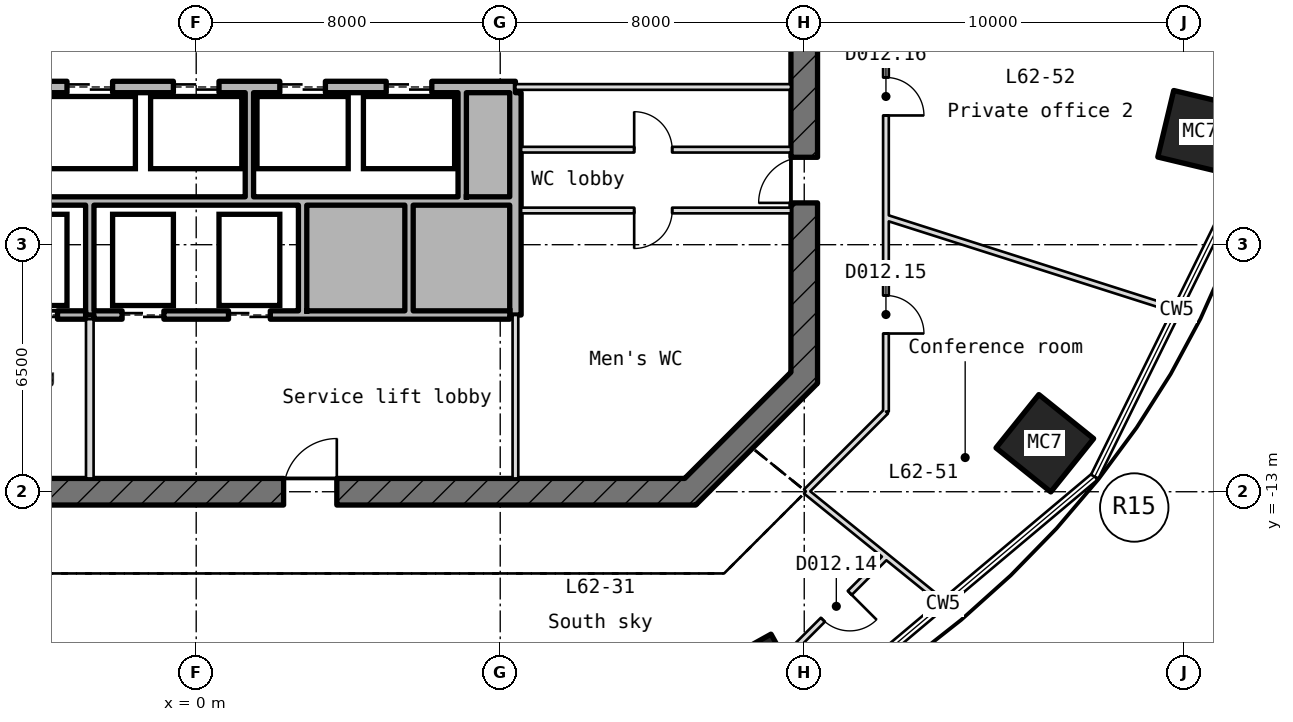
"""IFC4 building model, lengths in metres.
Left out: names, types, materials, properties, quantities, classifications, styles, units other than length and angle.
Written with IfcOpenShell. Run it as: python <this file> out.ifc"""

import sys

from ifc_helpers import new_model, si_unit, direction, frame, frame_2d, origin, origin_2d, place, context, subcontext, project, spatial, rectangle, hollow_rectangle, extrude, element, fill, save


model = new_model("IFC4")
c1 = context("Model", 3, precision=1e-05, world=origin(), true_north=direction((0.0, 1.0)))
c2 = subcontext(c1, "Body", "Model", "MODEL_VIEW")
j1 = project(units=[si_unit("LENGTHUNIT", "METRE"), si_unit("PLANEANGLEUNIT", "RADIAN")], contexts=[c1])
p1 = place(None, origin())
s1 = spatial("IfcSite", under=j1, at=p1, CompositionType="ELEMENT")
p2 = place(p1, origin())
s2 = spatial("IfcBuilding", under=s1, at=p2, CompositionType="ELEMENT")
p3 = place(p2, frame((0.0, 0.0, 279.1)))
s3 = spatial("IfcBuildingStorey", under=s2, at=p3, CompositionType="ELEMENT", Elevation=279.1)
for number, where, z_axis, x_axis in (
    (1, (14.788, -17.993, -0.25), (0.0, 0.0, 1.0), (-0.874, -0.486, 0.0)),
    (2, (22.331, -11.724, -0.25), (0.0, 0.0, 1.0), (-0.627, -0.779, 0.0)),
    (3, (26.413, -3.533, -0.25), (0.0, 0.0, 1.0), (-0.233, -0.973, 0.0)),
):
    element("IfcColumn", number, at=place(p3, frame(where, z_axis=z_axis, x_axis=x_axis)), inside=s3, PredefinedType="COLUMN", context=c2, shape_type="SweptSolid", body=[
        extrude(hollow_rectangle(XDim=1.8, YDim=1.85, WallThickness=0.06, at=origin_2d()), origin(), (0.0, 0.0, 1.0), 5.47),
    ])
p4 = place(p3, frame((12.897, -13.103, -0.25), z_axis=(0.0, 0.0, 1.0), x_axis=(0.707106781187, 0.707106781187, 0.0)))
e4 = element("IfcWall", 4, at=p4, inside=s3, PredefinedType="SHEAR", context=c2, shape_type="SweptSolid", body=[
    extrude(rectangle(XDim=4.533, YDim=0.7, at=frame_2d((2.266, 0.0))), origin(), (0.0, 0.0, 1.0), 5.47),
])
p5 = place(p3, frame((16.0, -10.145, -0.25), z_axis=(0.0, 0.0, 1.0), x_axis=(0.0, 1.0, 0.0)))
e5 = element("IfcWall", 5, at=p5, inside=s3, PredefinedType="SHEAR", context=c2, shape_type="SweptSolid", body=[
    extrude(rectangle(XDim=20.29, YDim=0.7, at=frame_2d((10.145, 0.0))), origin(), (0.0, 0.0, 1.0), 5.47),
])
p6 = place(p5, frame((8.945, 0.0, 0.25)))
e6 = element("IfcOpeningElement", 6, at=p6, cuts=e5, PredefinedType="OPENING", context=c2, shape_type="SweptSolid", body=[
    extrude(rectangle(XDim=2.4, YDim=2.1, at=frame_2d((1.2, 1.05))), frame((0.0, 0.36, 0.0), z_axis=(0.0, -1.0, 0.0), x_axis=(1.0, 0.0, 0.0)), (0.0, 0.0, 1.0), 0.72),
])
p7 = place(p5, frame((13.545, 0.0, 0.25)))
e7 = element("IfcOpeningElement", 7, at=p7, cuts=e5, PredefinedType="OPENING", context=c2, shape_type="SweptSolid", body=[
    extrude(rectangle(XDim=1.2, YDim=2.1, at=frame_2d((0.6, 1.05))), frame((0.0, 0.36, 0.0), z_axis=(0.0, -1.0, 0.0), x_axis=(1.0, 0.0, 0.0)), (0.0, 0.0, 1.0), 0.72),
])
p8 = place(p5, frame((4.745, 0.0, 0.25)))
e8 = element("IfcOpeningElement", 8, at=p8, cuts=e5, PredefinedType="OPENING", context=c2, shape_type="SweptSolid", body=[
    extrude(rectangle(XDim=1.2, YDim=2.1, at=frame_2d((0.6, 1.05))), frame((0.0, 0.36, 0.0), z_axis=(0.0, -1.0, 0.0), x_axis=(1.0, 0.0, 0.0)), (0.0, 0.0, 1.0), 0.72),
])
p9 = place(p3, frame((-13.145, -13.0, -0.25), z_axis=(0.0, 0.0, 1.0), x_axis=(1.0, 0.0, 0.0)))
e9 = element("IfcWall", 9, at=p9, inside=s3, PredefinedType="SHEAR", context=c2, shape_type="SweptSolid", body=[
    extrude(rectangle(XDim=26.29, YDim=0.7, at=frame_2d((13.145, 0.0))), origin(), (0.0, 0.0, 1.0), 5.47),
])
p10 = place(p9, frame((2.845, 0.0, 0.25)))
e10 = element("IfcOpeningElement", 10, at=p10, cuts=e9, PredefinedType="OPENING", context=c2, shape_type="SweptSolid", body=[
    extrude(rectangle(XDim=1.2, YDim=2.1, at=frame_2d((0.6, 1.05))), frame((0.0, 0.36, 0.0), z_axis=(0.0, -1.0, 0.0), x_axis=(1.0, 0.0, 0.0)), (0.0, 0.0, 1.0), 0.72),
])
p11 = place(p9, frame((6.845, 0.0, 0.25)))
e11 = element("IfcOpeningElement", 11, at=p11, cuts=e9, PredefinedType="OPENING", context=c2, shape_type="SweptSolid", body=[
    extrude(rectangle(XDim=1.4, YDim=2.1, at=frame_2d((0.7, 1.05))), frame((0.0, 0.36, 0.0), z_axis=(0.0, -1.0, 0.0), x_axis=(1.0, 0.0, 0.0)), (0.0, 0.0, 1.0), 0.72),
])
p12 = place(p9, frame((15.445, 0.0, 0.25)))
e12 = element("IfcOpeningElement", 12, at=p12, cuts=e9, PredefinedType="OPENING", context=c2, shape_type="SweptSolid", body=[
    extrude(rectangle(XDim=1.4, YDim=2.1, at=frame_2d((0.7, 1.05))), frame((0.0, 0.36, 0.0), z_axis=(0.0, -1.0, 0.0), x_axis=(1.0, 0.0, 0.0)), (0.0, 0.0, 1.0), 0.72),
])
p13 = place(p3, frame((-8.25, -8.35, 0.0), z_axis=(0.0, 0.0, 1.0), x_axis=(1.0, 0.0, 0.0)))
e13 = element("IfcWall", 13, at=p13, inside=s3, PredefinedType="STANDARD", context=c2, shape_type="SweptSolid", body=[
    extrude(rectangle(XDim=5.34, YDim=0.22, at=frame_2d((2.67, 0.0))), origin(), (0.0, 0.0, 1.0), 5.22),
])
p14 = place(p13, frame((0.7, 0.0, 0.0)))
e14 = element("IfcOpeningElement", 14, at=p14, cuts=e13, PredefinedType="OPENING", context=c2, shape_type="SweptSolid", body=[
    extrude(rectangle(XDim=1.1, YDim=2.1, at=frame_2d((0.55, 1.05))), frame((0.0, 0.12, 0.0), z_axis=(0.0, -1.0, 0.0), x_axis=(1.0, 0.0, 0.0)), (0.0, 0.0, 1.0), 0.24),
])
p15 = place(p13, frame((3.5, 0.0, 0.0)))
e15 = element("IfcOpeningElement", 15, at=p15, cuts=e13, PredefinedType="OPENING", context=c2, shape_type="SweptSolid", body=[
    extrude(rectangle(XDim=1.1, YDim=2.1, at=frame_2d((0.55, 1.05))), frame((0.0, 0.12, 0.0), z_axis=(0.0, -1.0, 0.0), x_axis=(1.0, 0.0, 0.0)), (0.0, 0.0, 1.0), 0.24),
])
p16 = place(p3, frame((-2.69, -8.35, 0.0), z_axis=(0.0, 0.0, 1.0), x_axis=(1.0, 0.0, 0.0)))
e16 = element("IfcWall", 16, at=p16, inside=s3, PredefinedType="STANDARD", context=c2, shape_type="SweptSolid", body=[
    extrude(rectangle(XDim=10.94, YDim=0.22, at=frame_2d((5.47, 0.0))), origin(), (0.0, 0.0, 1.0), 5.22),
])
p17 = place(p16, frame((0.74, 0.0, 0.0)))
e17 = element("IfcOpeningElement", 17, at=p17, cuts=e16, PredefinedType="OPENING", context=c2, shape_type="SweptSolid", body=[
    extrude(rectangle(XDim=1.1, YDim=2.1, at=frame_2d((0.55, 1.05))), frame((0.0, 0.12, 0.0), z_axis=(0.0, -1.0, 0.0), x_axis=(1.0, 0.0, 0.0)), (0.0, 0.0, 1.0), 0.24),
])
p18 = place(p16, frame((3.54, 0.0, 0.0)))
e18 = element("IfcOpeningElement", 18, at=p18, cuts=e16, PredefinedType="OPENING", context=c2, shape_type="SweptSolid", body=[
    extrude(rectangle(XDim=1.1, YDim=2.1, at=frame_2d((0.55, 1.05))), frame((0.0, 0.12, 0.0), z_axis=(0.0, -1.0, 0.0), x_axis=(1.0, 0.0, 0.0)), (0.0, 0.0, 1.0), 0.24),
])
p19 = place(p3, frame((8.55, -5.6, 0.0), z_axis=(0.0, 0.0, 1.0), x_axis=(1.0, 0.0, 0.0)))
e19 = element("IfcWall", 19, at=p19, inside=s3, PredefinedType="PARTITIONING", context=c2, shape_type="SweptSolid", body=[
    extrude(rectangle(XDim=7.1, YDim=0.15, at=frame_2d((3.55, 0.0))), origin(), (0.0, 0.0, 1.0), 5.22),
])
p20 = place(p19, frame((2.975, 0.0, 0.0)))
e20 = element("IfcOpeningElement", 20, at=p20, cuts=e19, PredefinedType="OPENING", context=c2, shape_type="SweptSolid", body=[
    extrude(rectangle(XDim=1.0, YDim=2.1, at=frame_2d((0.5, 1.05))), frame((0.0, 0.085, 0.0), z_axis=(0.0, -1.0, 0.0), x_axis=(1.0, 0.0, 0.0)), (0.0, 0.0, 1.0), 0.17),
])
p21 = place(p3, frame((-8.25, -5.35, 0.0), z_axis=(0.0, 0.0, 1.0), x_axis=(1.0, 0.0, 0.0)))
e21 = element("IfcWall", 21, at=p21, inside=s3, PredefinedType="STANDARD", context=c2, shape_type="SweptSolid", body=[
    extrude(rectangle(XDim=16.5, YDim=0.22, at=frame_2d((8.25, 0.0))), origin(), (0.0, 0.0, 1.0), 5.22),
])
p22 = place(p3, frame((8.55, -4.0, 0.0), z_axis=(0.0, 0.0, 1.0), x_axis=(1.0, 0.0, 0.0)))
e22 = element("IfcWall", 22, at=p22, inside=s3, PredefinedType="PARTITIONING", context=c2, shape_type="SweptSolid", body=[
    extrude(rectangle(XDim=7.1, YDim=0.15, at=frame_2d((3.55, 0.0))), origin(), (0.0, 0.0, 1.0), 5.22),
])
p23 = place(p22, frame((2.975, 0.0, 0.0)))
e23 = element("IfcOpeningElement", 23, at=p23, cuts=e22, PredefinedType="OPENING", context=c2, shape_type="SweptSolid", body=[
    extrude(rectangle(XDim=1.0, YDim=2.1, at=frame_2d((0.5, 1.05))), frame((0.0, 0.085, 0.0), z_axis=(0.0, -1.0, 0.0), x_axis=(1.0, 0.0, 0.0)), (0.0, 0.0, 1.0), 0.17),
])
p24 = place(p3, frame((-8.4, -2.35, -0.25), z_axis=(0.0, 0.0, 1.0), x_axis=(1.0, 0.0, 0.0)))
e24 = element("IfcWall", 24, at=p24, inside=s3, PredefinedType="SHEAR", context=c2, shape_type="SweptSolid", body=[
    extrude(rectangle(XDim=16.8, YDim=0.3, at=frame_2d((8.4, 0.0))), origin(), (0.0, 0.0, 1.0), 5.47),
])
p25 = place(p24, frame((2.2, 0.0, 0.25)))
e25 = element("IfcOpeningElement", 25, at=p25, cuts=e24, PredefinedType="OPENING", context=c2, shape_type="SweptSolid", body=[
    extrude(rectangle(XDim=1.2, YDim=2.1, at=frame_2d((0.6, 1.05))), frame((0.0, 0.16, 0.0), z_axis=(0.0, -1.0, 0.0), x_axis=(1.0, 0.0, 0.0)), (0.0, 0.0, 1.0), 0.32),
])
p26 = place(p24, frame((5.0, 0.0, 0.25)))
e26 = element("IfcOpeningElement", 26, at=p26, cuts=e24, PredefinedType="OPENING", context=c2, shape_type="SweptSolid", body=[
    extrude(rectangle(XDim=1.2, YDim=2.1, at=frame_2d((0.6, 1.05))), frame((0.0, 0.16, 0.0), z_axis=(0.0, -1.0, 0.0), x_axis=(1.0, 0.0, 0.0)), (0.0, 0.0, 1.0), 0.32),
])
p27 = place(p24, frame((7.8, 0.0, 0.25)))
e27 = element("IfcOpeningElement", 27, at=p27, cuts=e24, PredefinedType="OPENING", context=c2, shape_type="SweptSolid", body=[
    extrude(rectangle(XDim=1.2, YDim=2.1, at=frame_2d((0.6, 1.05))), frame((0.0, 0.16, 0.0), z_axis=(0.0, -1.0, 0.0), x_axis=(1.0, 0.0, 0.0)), (0.0, 0.0, 1.0), 0.32),
])
p28 = place(p24, frame((10.6, 0.0, 0.25)))
e28 = element("IfcOpeningElement", 28, at=p28, cuts=e24, PredefinedType="OPENING", context=c2, shape_type="SweptSolid", body=[
    extrude(rectangle(XDim=1.2, YDim=2.1, at=frame_2d((0.6, 1.05))), frame((0.0, 0.16, 0.0), z_axis=(0.0, -1.0, 0.0), x_axis=(1.0, 0.0, 0.0)), (0.0, 0.0, 1.0), 0.32),
])
p29 = place(p24, frame((13.4, 0.0, 0.25)))
e29 = element("IfcOpeningElement", 29, at=p29, cuts=e24, PredefinedType="OPENING", context=c2, shape_type="SweptSolid", body=[
    extrude(rectangle(XDim=1.2, YDim=2.1, at=frame_2d((0.6, 1.05))), frame((0.0, 0.16, 0.0), z_axis=(0.0, -1.0, 0.0), x_axis=(1.0, 0.0, 0.0)), (0.0, 0.0, 1.0), 0.32),
])
p30 = place(p3, frame((8.4, -2.35, 0.0), z_axis=(0.0, 0.0, 1.0), x_axis=(1.0, 0.0, 0.0)))
e30 = element("IfcWall", 30, at=p30, inside=s3, PredefinedType="PARTITIONING", context=c2, shape_type="SweptSolid", body=[
    extrude(rectangle(XDim=7.25, YDim=0.15, at=frame_2d((3.625, 0.0))), origin(), (0.0, 0.0, 1.0), 5.22),
])
p31 = place(p3, frame((-2.8, -12.65, 0.0), z_axis=(0.0, 0.0, 1.0), x_axis=(0.0, 1.0, 0.0)))
e31 = element("IfcWall", 31, at=p31, inside=s3, PredefinedType="PARTITIONING", context=c2, shape_type="SweptSolid", body=[
    extrude(rectangle(XDim=4.19, YDim=0.2, at=frame_2d((2.095, 0.0))), origin(), (0.0, 0.0, 1.0), 5.22),
])
p32 = place(p3, frame((-2.8, -8.35, 0.0), z_axis=(0.0, 0.0, 1.0), x_axis=(0.0, 1.0, 0.0)))
e32 = element("IfcWall", 32, at=p32, inside=s3, PredefinedType="STANDARD", context=c2, shape_type="SweptSolid", body=[
    extrude(rectangle(XDim=2.89, YDim=0.22, at=frame_2d((1.445, 0.0))), origin(), (0.0, 0.0, 1.0), 5.22),
])
p33 = place(p3, frame((1.4, -5.24, 0.0), z_axis=(0.0, 0.0, 1.0), x_axis=(0.0, 1.0, 0.0)))
e33 = element("IfcWall", 33, at=p33, inside=s3, PredefinedType="STANDARD", context=c2, shape_type="SweptSolid", body=[
    extrude(rectangle(XDim=2.74, YDim=0.22, at=frame_2d((1.37, 0.0))), origin(), (0.0, 0.0, 1.0), 5.22),
])
for number, where, z_axis, x_axis in (
    (34, (2.8, -8.24, 0.0), (0.0, 0.0, 1.0), (0.0, 1.0, 0.0)),
    (35, (5.6, -8.24, 0.0), (0.0, 0.0, 1.0), (0.0, 1.0, 0.0)),
):
    element("IfcWall", number, at=place(p3, frame(where, z_axis=z_axis, x_axis=x_axis)), inside=s3, PredefinedType="STANDARD", context=c2, shape_type="SweptSolid", body=[
        extrude(rectangle(XDim=2.78, YDim=0.22, at=frame_2d((1.39, 0.0))), origin(), (0.0, 0.0, 1.0), 5.22),
    ])
p34 = place(p3, frame((7.0, -5.24, 0.0), z_axis=(0.0, 0.0, 1.0), x_axis=(0.0, 1.0, 0.0)))
e36 = element("IfcWall", 36, at=p34, inside=s3, PredefinedType="STANDARD", context=c2, shape_type="SweptSolid", body=[
    extrude(rectangle(XDim=2.74, YDim=0.22, at=frame_2d((1.37, 0.0))), origin(), (0.0, 0.0, 1.0), 5.22),
])
p35 = place(p3, frame((8.4, -12.65, 0.0), z_axis=(0.0, 0.0, 1.0), x_axis=(0.0, 1.0, 0.0)))
e37 = element("IfcWall", 37, at=p35, inside=s3, PredefinedType="PARTITIONING", context=c2, shape_type="SweptSolid", body=[
    extrude(rectangle(XDim=4.3, YDim=0.15, at=frame_2d((2.15, 0.0))), origin(), (0.0, 0.0, 1.0), 5.22),
])
p36 = place(p3, frame((8.4, -8.35, -0.25), z_axis=(0.0, 0.0, 1.0), x_axis=(0.0, 1.0, 0.0)))
e38 = element("IfcWall", 38, at=p36, inside=s3, PredefinedType="SHEAR", context=c2, shape_type="SweptSolid", body=[
    extrude(rectangle(XDim=5.85, YDim=0.3, at=frame_2d((2.925, 0.0))), origin(), (0.0, 0.0, 1.0), 5.47),
])
p37 = place(p3, frame((15.551, -17.308, 0.0), z_axis=(0.0, 0.0, 1.0), x_axis=(0.707106781187, 0.707106781187, 0.0)))
e39 = element("IfcWall", 39, at=p37, inside=s3, PredefinedType="PARTITIONING", context=c2, shape_type="SweptSolid", body=[
    extrude(rectangle(XDim=2.428, YDim=0.15, at=frame_2d((1.214, 0.0))), origin(), (0.0, 0.0, 1.0), 4.758),
])
p38 = place(p37, frame((1.328, 0.0, 0.0)))
e40 = element("IfcOpeningElement", 40, at=p38, cuts=e39, PredefinedType="OPENING", context=c2, shape_type="SweptSolid", body=[
    extrude(rectangle(XDim=1.0, YDim=2.1, at=frame_2d((0.5, 1.05))), frame((0.0, 0.085, 0.0), z_axis=(0.0, -1.0, 0.0), x_axis=(1.0, 0.0, 0.0)), (0.0, 0.0, 1.0), 0.17),
])
p39 = place(p3, frame((17.268, -15.591, 0.0), z_axis=(0.0, 0.0, 1.0), x_axis=(0.707106781187, 0.707106781187, 0.0)))
e41 = element("IfcWall", 41, at=p39, inside=s3, PredefinedType="PARTITIONING", context=c2, shape_type="SweptSolid", body=[
    extrude(rectangle(XDim=1.228, YDim=0.15, at=frame_2d((0.614, 0.0))), origin(), (0.0, 0.0, 1.0), 5.22),
])
p40 = place(p3, frame((16.046, -12.994, 0.0), z_axis=(0.0, 0.0, 1.0), x_axis=(0.707106781187, 0.707106781187, 0.0)))
e42 = element("IfcWall", 42, at=p40, inside=s3, PredefinedType="PARTITIONING", context=c2, shape_type="SweptSolid", body=[
    extrude(rectangle(XDim=2.975, YDim=0.15, at=frame_2d((1.487, 0.0))), origin(), (0.0, 0.0, 1.0), 5.22),
])
p41 = place(p3, frame((18.15, -10.891, 0.0), z_axis=(0.0, 0.0, 1.0), x_axis=(0.0, 1.0, 0.0)))
e43 = element("IfcWall", 43, at=p41, inside=s3, PredefinedType="PARTITIONING", context=c2, shape_type="SweptSolid", body=[
    extrude(rectangle(XDim=21.781, YDim=0.15, at=frame_2d((10.891, 0.0))), origin(), (0.0, 0.0, 1.0), 5.22),
])
p42 = place(p41, frame((2.054, 0.0, 0.0)))
e44 = element("IfcOpeningElement", 44, at=p42, cuts=e43, PredefinedType="OPENING", context=c2, shape_type="SweptSolid", body=[
    extrude(rectangle(XDim=1.0, YDim=2.1, at=frame_2d((0.5, 1.05))), frame((0.0, 0.085, 0.0), z_axis=(0.0, -1.0, 0.0), x_axis=(1.0, 0.0, 0.0)), (0.0, 0.0, 1.0), 0.17),
])
p43 = place(p41, frame((7.791, 0.0, 0.0)))
e45 = element("IfcOpeningElement", 45, at=p43, cuts=e43, PredefinedType="OPENING", context=c2, shape_type="SweptSolid", body=[
    extrude(rectangle(XDim=1.0, YDim=2.1, at=frame_2d((0.5, 1.05))), frame((0.0, 0.085, 0.0), z_axis=(0.0, -1.0, 0.0), x_axis=(1.0, 0.0, 0.0)), (0.0, 0.0, 1.0), 0.17),
])
p44 = place(p41, frame((14.207, 0.0, 0.0)))
e46 = element("IfcOpeningElement", 46, at=p44, cuts=e43, PredefinedType="OPENING", context=c2, shape_type="SweptSolid", body=[
    extrude(rectangle(XDim=1.0, YDim=2.1, at=frame_2d((0.5, 1.05))), frame((0.0, 0.085, 0.0), z_axis=(0.0, -1.0, 0.0), x_axis=(1.0, 0.0, 0.0)), (0.0, 0.0, 1.0), 0.17),
])
p45 = place(p3, frame((19.658, -15.919, 0.0), z_axis=(0.0, 0.0, 1.0), x_axis=(-0.777148316215, 0.629317483155, 0.0)))
e47 = element("IfcWall", 47, at=p45, inside=s3, PredefinedType="PARTITIONING", context=c2, shape_type="SweptSolid", body=[
    extrude(rectangle(XDim=4.652, YDim=0.15, at=frame_2d((2.326, 0.0))), origin(), (0.0, 0.0, 1.0), 5.22),
])
p46 = place(p3, frame((25.784, -8.216, 0.0), z_axis=(0.0, 0.0, 1.0), x_axis=(-0.952807256027, 0.303575909555, 0.0)))
e48 = element("IfcWall", 48, at=p46, inside=s3, PredefinedType="PARTITIONING", context=c2, shape_type="SweptSolid", body=[
    extrude(rectangle(XDim=8.012, YDim=0.15, at=frame_2d((4.006, 0.0))), origin(), (0.0, 0.0, 1.0), 5.22),
])
p47 = place(p26, origin())
e49 = element("IfcDoor", 49, at=p47, inside=s3, OperationType="DOUBLE_DOOR_SLIDING", PredefinedType="DOOR", context=c2, shape_type="SweptSolid", body=[
    extrude(rectangle(XDim=1.2, YDim=2.1, at=frame_2d((0.6, 1.05))), frame((0.0, 0.025, 0.0), z_axis=(0.0, -1.0, 0.0), x_axis=(1.0, 0.0, 0.0)), (0.0, 0.0, 1.0), 0.05),
])
fill(e26, e49)
p48 = place(p27, origin())
e50 = element("IfcDoor", 50, at=p48, inside=s3, OperationType="DOUBLE_DOOR_SLIDING", PredefinedType="DOOR", context=c2, shape_type="SweptSolid", body=[
    extrude(rectangle(XDim=1.2, YDim=2.1, at=frame_2d((0.6, 1.05))), frame((0.0, 0.025, 0.0), z_axis=(0.0, -1.0, 0.0), x_axis=(1.0, 0.0, 0.0)), (0.0, 0.0, 1.0), 0.05),
])
fill(e27, e50)
p49 = place(p28, origin())
e51 = element("IfcDoor", 51, at=p49, inside=s3, OperationType="DOUBLE_DOOR_SLIDING", PredefinedType="DOOR", context=c2, shape_type="SweptSolid", body=[
    extrude(rectangle(XDim=1.2, YDim=2.1, at=frame_2d((0.6, 1.05))), frame((0.0, 0.025, 0.0), z_axis=(0.0, -1.0, 0.0), x_axis=(1.0, 0.0, 0.0)), (0.0, 0.0, 1.0), 0.05),
])
fill(e28, e51)
p50 = place(p29, origin())
e52 = element("IfcDoor", 52, at=p50, inside=s3, OperationType="DOUBLE_DOOR_SLIDING", PredefinedType="DOOR", context=c2, shape_type="SweptSolid", body=[
    extrude(rectangle(XDim=1.2, YDim=2.1, at=frame_2d((0.6, 1.05))), frame((0.0, 0.025, 0.0), z_axis=(0.0, -1.0, 0.0), x_axis=(1.0, 0.0, 0.0)), (0.0, 0.0, 1.0), 0.05),
])
fill(e29, e52)
p51 = place(p15, origin())
e53 = element("IfcDoor", 53, at=p51, inside=s3, OperationType="DOUBLE_DOOR_SLIDING", PredefinedType="DOOR", context=c2, shape_type="SweptSolid", body=[
    extrude(rectangle(XDim=1.1, YDim=2.1, at=frame_2d((0.55, 1.05))), frame((0.0, 0.025, 0.0), z_axis=(0.0, -1.0, 0.0), x_axis=(1.0, 0.0, 0.0)), (0.0, 0.0, 1.0), 0.05),
])
fill(e15, e53)
p52 = place(p17, origin())
e54 = element("IfcDoor", 54, at=p52, inside=s3, OperationType="DOUBLE_DOOR_SLIDING", PredefinedType="DOOR", context=c2, shape_type="SweptSolid", body=[
    extrude(rectangle(XDim=1.1, YDim=2.1, at=frame_2d((0.55, 1.05))), frame((0.0, 0.025, 0.0), z_axis=(0.0, -1.0, 0.0), x_axis=(1.0, 0.0, 0.0)), (0.0, 0.0, 1.0), 0.05),
])
fill(e17, e54)
p53 = place(p18, origin())
e55 = element("IfcDoor", 55, at=p53, inside=s3, OperationType="DOUBLE_DOOR_SLIDING", PredefinedType="DOOR", context=c2, shape_type="SweptSolid", body=[
    extrude(rectangle(XDim=1.1, YDim=2.1, at=frame_2d((0.55, 1.05))), frame((0.0, 0.025, 0.0), z_axis=(0.0, -1.0, 0.0), x_axis=(1.0, 0.0, 0.0)), (0.0, 0.0, 1.0), 0.05),
])
fill(e18, e55)
p54 = place(p12, origin())
e56 = element("IfcDoor", 56, at=p54, inside=s3, OperationType="SINGLE_SWING_RIGHT", PredefinedType="DOOR", context=c2, shape_type="SweptSolid", body=[
    extrude(rectangle(XDim=1.4, YDim=2.1, at=frame_2d((0.7, 1.05))), frame((0.0, 0.025, 0.0), z_axis=(0.0, -1.0, 0.0), x_axis=(1.0, 0.0, 0.0)), (0.0, 0.0, 1.0), 0.05),
])
fill(e12, e56)
p55 = place(p23, origin())
e57 = element("IfcDoor", 57, at=p55, inside=s3, OperationType="SINGLE_SWING_RIGHT", PredefinedType="DOOR", context=c2, shape_type="SweptSolid", body=[
    extrude(rectangle(XDim=1.0, YDim=2.1, at=frame_2d((0.5, 1.05))), frame((0.0, 0.025, 0.0), z_axis=(0.0, -1.0, 0.0), x_axis=(1.0, 0.0, 0.0)), (0.0, 0.0, 1.0), 0.05),
])
fill(e23, e57)
p56 = place(p8, origin())
e58 = element("IfcDoor", 58, at=p56, inside=s3, OperationType="SINGLE_SWING_RIGHT", PredefinedType="DOOR", context=c2, shape_type="SweptSolid", body=[
    extrude(rectangle(XDim=1.2, YDim=2.1, at=frame_2d((0.6, 1.05))), frame((0.0, 0.025, 0.0), z_axis=(0.0, -1.0, 0.0), x_axis=(1.0, 0.0, 0.0)), (0.0, 0.0, 1.0), 0.05),
])
fill(e8, e58)
p57 = place(p20, frame((1.0, 0.0, 0.0), z_axis=(0.0, 0.0, 1.0), x_axis=(-1.0, 0.0, 0.0)))
e59 = element("IfcDoor", 59, at=p57, inside=s3, OperationType="SINGLE_SWING_LEFT", PredefinedType="DOOR", context=c2, shape_type="SweptSolid", body=[
    extrude(rectangle(XDim=1.0, YDim=2.1, at=frame_2d((0.5, 1.05))), frame((0.0, 0.025, 0.0), z_axis=(0.0, -1.0, 0.0), x_axis=(1.0, 0.0, 0.0)), (0.0, 0.0, 1.0), 0.05),
])
fill(e20, e59)
p58 = place(p38, frame((1.0, 0.0, 0.0), z_axis=(0.0, 0.0, 1.0), x_axis=(-1.0, 0.0, 0.0)))
e60 = element("IfcDoor", 60, at=p58, inside=s3, OperationType="SINGLE_SWING_LEFT", PredefinedType="DOOR", context=c2, shape_type="SweptSolid", body=[
    extrude(rectangle(XDim=1.0, YDim=2.1, at=frame_2d((0.5, 1.05))), frame((0.0, 0.025, 0.0), z_axis=(0.0, -1.0, 0.0), x_axis=(1.0, 0.0, 0.0)), (0.0, 0.0, 1.0), 0.05),
])
fill(e40, e60)
p59 = place(p42, frame((1.0, 0.0, 0.0), z_axis=(0.0, 0.0, 1.0), x_axis=(-1.0, 0.0, 0.0)))
e61 = element("IfcDoor", 61, at=p59, inside=s3, OperationType="SINGLE_SWING_LEFT", PredefinedType="DOOR", context=c2, shape_type="SweptSolid", body=[
    extrude(rectangle(XDim=1.0, YDim=2.1, at=frame_2d((0.5, 1.05))), frame((0.0, 0.025, 0.0), z_axis=(0.0, -1.0, 0.0), x_axis=(1.0, 0.0, 0.0)), (0.0, 0.0, 1.0), 0.05),
])
fill(e44, e61)
p60 = place(p43, frame((1.0, 0.0, 0.0), z_axis=(0.0, 0.0, 1.0), x_axis=(-1.0, 0.0, 0.0)))
e62 = element("IfcDoor", 62, at=p60, inside=s3, OperationType="SINGLE_SWING_LEFT", PredefinedType="DOOR", context=c2, shape_type="SweptSolid", body=[
    extrude(rectangle(XDim=1.0, YDim=2.1, at=frame_2d((0.5, 1.05))), frame((0.0, 0.025, 0.0), z_axis=(0.0, -1.0, 0.0), x_axis=(1.0, 0.0, 0.0)), (0.0, 0.0, 1.0), 0.05),
])
fill(e45, e62)
save(model, sys.argv[1])
